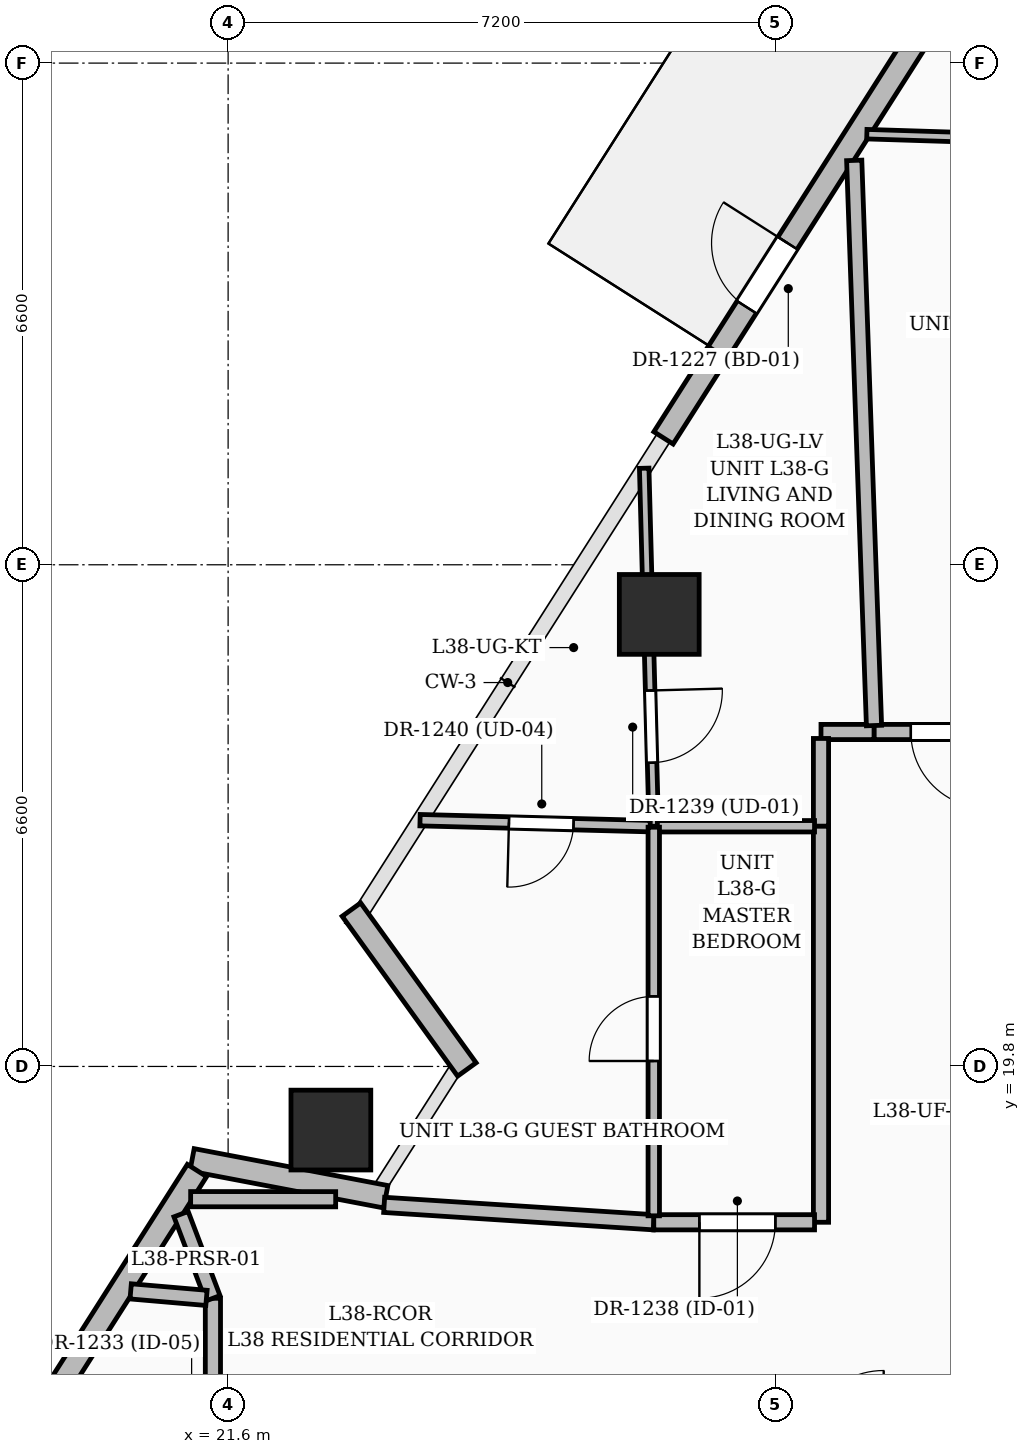
"""IFC4 building model, lengths in metres.
Left out: names, types, materials, properties, quantities, classifications, styles, units other than length and angle.
Written with IfcOpenShell. Run it as: python <this file> out.ifc"""

import sys

from ifc_helpers import new_model, si_unit, direction, frame, frame_2d, origin, origin_2d, place, context, subcontext, project, spatial, rectangle, extrude, element, fill, save


model = new_model("IFC4")
c1 = context("Model", 3, precision=1e-05, world=origin(), true_north=direction((0.0, 1.0)))
c2 = subcontext(c1, "Body", "Model", "MODEL_VIEW")
j1 = project(units=[si_unit("LENGTHUNIT", "METRE"), si_unit("PLANEANGLEUNIT", "RADIAN")], contexts=[c1])
p1 = place(None, origin())
s1 = spatial("IfcSite", under=j1, at=p1, CompositionType="ELEMENT")
p2 = place(p1, origin())
s2 = spatial("IfcBuilding", under=s1, at=p2, CompositionType="ELEMENT")
p3 = place(p2, frame((0.0, 0.0, 150.0)))
s3 = spatial("IfcBuildingStorey", under=s2, at=p3, CompositionType="ELEMENT", Elevation=150.0)
for number, where, z_axis, x_axis in (
    (1, (27.272, 25.747, 0.0), (0.0, 0.0, 1.0), (1.0, 0.0, 0.0)),
    (2, (22.952, 18.963, 0.0), (0.0, 0.0, 1.0), (1.0, 0.0, 0.0)),
):
    element("IfcColumn", number, at=place(p3, frame(where, z_axis=z_axis, x_axis=x_axis)), inside=s3, PredefinedType="COLUMN", context=c2, shape_type="SweptSolid", body=[
        extrude(rectangle(XDim=1.05, YDim=1.05, at=origin_2d()), origin(), (0.0, 0.0, 1.0), 3.6),
    ])
p4 = place(p3, frame((21.125, 18.571, 0.0), z_axis=(0.0, 0.0, 1.0), x_axis=(0.982321262429, -0.187202931012, 0.0)))
e3 = element("IfcWall", 3, at=p4, inside=s3, PredefinedType="SOLIDWALL", context=c2, shape_type="SweptSolid", body=[
    extrude(rectangle(XDim=2.594, YDim=0.3, at=frame_2d((1.297, 0.0))), origin(), (0.0, 0.0, 1.0), 2.3),
])
p5 = place(p3, frame((24.741, 19.76, 0.0), z_axis=(0.0, 0.0, 1.0), x_axis=(-0.585538656592, 0.810644485355, 0.0)))
e4 = element("IfcWall", 4, at=p5, inside=s3, PredefinedType="SOLIDWALL", context=c2, shape_type="SweptSolid", body=[
    extrude(rectangle(XDim=2.594, YDim=0.3, at=frame_2d((1.297, 0.0))), origin(), (0.0, 0.0, 1.0), 2.575),
])
p6 = place(p3, frame((27.328, 28.069, 0.0), z_axis=(0.0, 0.0, 1.0), x_axis=(0.537125937868, 0.843502060975, 0.0)))
e5 = element("IfcWall", 5, at=p6, inside=s3, PredefinedType="SOLIDWALL", context=c2, shape_type="SweptSolid", body=[
    extrude(rectangle(XDim=7.632, YDim=0.3, at=frame_2d((3.816, 0.0))), origin(), (0.0, 0.0, 1.0), 3.35),
])
p7 = place(p6, frame((2.038, 0.0, 0.0)))
e6 = element("IfcOpeningElement", 6, at=p7, cuts=e5, PredefinedType="OPENING", context=c2, shape_type="SweptSolid", body=[
    extrude(rectangle(XDim=1.0, YDim=2.2, at=frame_2d((0.5, 1.1))), frame((0.0, 0.16, 0.0), z_axis=(0.0, -1.0, 0.0), x_axis=(1.0, 0.0, 0.0)), (0.0, 0.0, 1.0), 0.32),
])
p8 = place(p3, frame((17.006, 11.86, 0.0), z_axis=(0.0, 0.0, 1.0), x_axis=(0.537098524817, 0.843519516454, 0.0)))
e7 = element("IfcWall", 7, at=p8, inside=s3, PredefinedType="SOLIDWALL", context=c2, shape_type="SweptSolid", body=[
    extrude(rectangle(XDim=7.791, YDim=0.3, at=frame_2d((3.895, 0.0))), origin(), (0.0, 0.0, 1.0), 3.35),
])
p9 = place(p8, frame((2.675, 0.0, 0.8)))
e8 = element("IfcOpeningElement", 8, at=p9, cuts=e7, PredefinedType="OPENING", context=c2, shape_type="SweptSolid", body=[
    extrude(rectangle(XDim=1.2, YDim=1.8, at=frame_2d((0.6, 0.9))), frame((0.0, 0.16, 0.0), z_axis=(0.0, -1.0, 0.0), x_axis=(1.0, 0.0, 0.0)), (0.0, 0.0, 1.0), 0.32),
])
p10 = place(p3, frame((21.4, 16.75, 0.0), z_axis=(0.0, 0.0, 1.0), x_axis=(0.0, -1.0, 0.0)))
e9 = element("IfcWall", 9, at=p10, inside=s3, PredefinedType="PARTITIONING", context=c2, shape_type="SweptSolid", body=[
    extrude(rectangle(XDim=4.5, YDim=0.2, at=frame_2d((2.25, 0.0))), origin(), (0.0, 0.0, 1.0), 2.57),
])
p11 = place(p10, frame((1.45, 0.0, 0.0)))
e10 = element("IfcOpeningElement", 10, at=p11, cuts=e9, PredefinedType="OPENING", context=c2, shape_type="SweptSolid", body=[
    extrude(rectangle(XDim=1.6, YDim=2.3, at=frame_2d((0.8, 1.15))), frame((0.0, 0.11, 0.0), z_axis=(0.0, -1.0, 0.0), x_axis=(1.0, 0.0, 0.0)), (0.0, 0.0, 1.0), 0.22),
])
p12 = place(p3, frame((30.1, 24.2, 0.0), z_axis=(0.0, 0.0, 1.0), x_axis=(-1.0, 0.0, 0.0)))
e11 = element("IfcWall", 11, at=p12, inside=s3, PredefinedType="PARTITIONING", context=c2, shape_type="SweptSolid", body=[
    extrude(rectangle(XDim=0.7, YDim=0.2, at=frame_2d((0.35, 0.0))), origin(), (0.0, 0.0, 1.0), 1.12),
])
p13 = place(p3, frame((29.4, 24.115, 0.0), z_axis=(0.0, 0.0, 1.0), x_axis=(0.0, -1.0, 0.0)))
e12 = element("IfcWall", 12, at=p13, inside=s3, PredefinedType="PARTITIONING", context=c2, shape_type="SweptSolid", body=[
    extrude(rectangle(XDim=1.155, YDim=0.2, at=frame_2d((0.578, 0.0))), origin(), (0.0, 0.0, 1.0), 1.12),
])
p14 = place(p3, frame((27.2, 17.75, 0.0), z_axis=(0.0, 0.0, 1.0), x_axis=(-0.997922175828, 0.064430823302, 0.0)))
e13 = element("IfcWall", 13, at=p14, inside=s3, PredefinedType="PARTITIONING", context=c2, shape_type="SweptSolid", body=[
    extrude(rectangle(XDim=3.554, YDim=0.2, at=frame_2d((1.777, 0.0))), origin(), (0.0, 0.0, 1.0), 1.12),
])
p15 = place(p3, frame((20.981, 17.857, 0.0), z_axis=(0.0, 0.0, 1.0), x_axis=(0.353970125301, -0.935256729671, 0.0)))
e14 = element("IfcWall", 14, at=p15, inside=s3, PredefinedType="PARTITIONING", context=c2, shape_type="SweptSolid", body=[
    extrude(rectangle(XDim=1.184, YDim=0.2, at=frame_2d((0.592, 0.0))), origin(), (0.0, 0.0, 1.0), 2.57),
])
p16 = place(p3, frame((29.4, 22.96, 0.0), z_axis=(0.0, 0.0, 1.0), x_axis=(0.0, -1.0, 0.0)))
e15 = element("IfcWall", 15, at=p16, inside=s3, PredefinedType="PARTITIONING", context=c2, shape_type="SweptSolid", body=[
    extrude(rectangle(XDim=5.21, YDim=0.2, at=frame_2d((2.605, 0.0))), origin(), (0.0, 0.0, 1.0), 1.12),
])
p17 = place(p3, frame((29.315, 17.75, 0.0), z_axis=(0.0, 0.0, 1.0), x_axis=(-1.0, 0.0, 0.0)))
e16 = element("IfcWall", 16, at=p17, inside=s3, PredefinedType="PARTITIONING", context=c2, shape_type="SweptSolid", body=[
    extrude(rectangle(XDim=2.115, YDim=0.2, at=frame_2d((1.058, 0.0))), origin(), (0.0, 0.0, 1.0), 2.86),
])
p18 = place(p17, frame((0.515, 0.0, 0.0)))
e17 = element("IfcOpeningElement", 17, at=p18, cuts=e16, PredefinedType="OPENING", context=c2, shape_type="SweptSolid", body=[
    extrude(rectangle(XDim=1.0, YDim=2.2, at=frame_2d((0.5, 1.1))), frame((0.0, 0.11, 0.0), z_axis=(0.0, -1.0, 0.0), x_axis=(1.0, 0.0, 0.0)), (0.0, 0.0, 1.0), 0.22),
])
p19 = place(p3, frame((31.865, 24.2, 0.0), z_axis=(0.0, 0.0, 1.0), x_axis=(-1.0, 0.0, 0.0)))
e18 = element("IfcWall", 18, at=p19, inside=s3, PredefinedType="PARTITIONING", context=c2, shape_type="SweptSolid", body=[
    extrude(rectangle(XDim=1.765, YDim=0.2, at=frame_2d((0.882, 0.0))), origin(), (0.0, 0.0, 1.0), 2.86),
])
p20 = place(p19, frame((0.283, 0.0, 0.0)))
e19 = element("IfcOpeningElement", 19, at=p20, cuts=e18, PredefinedType="OPENING", context=c2, shape_type="SweptSolid", body=[
    extrude(rectangle(XDim=1.0, YDim=2.2, at=frame_2d((0.5, 1.1))), frame((0.0, 0.11, 0.0), z_axis=(0.0, -1.0, 0.0), x_axis=(1.0, 0.0, 0.0)), (0.0, 0.0, 1.0), 0.22),
])
p21 = place(p3, frame((21.315, 16.755, 0.0), z_axis=(0.0, 0.0, 1.0), x_axis=(-0.996327050831, 0.085629479638, 0.0)))
e20 = element("IfcWall", 20, at=p21, inside=s3, PredefinedType="PARTITIONING", context=c2, shape_type="SweptSolid", body=[
    extrude(rectangle(XDim=1.001, YDim=0.2, at=frame_2d((0.5, 0.0))), origin(), (0.0, 0.0, 1.0), 2.57),
])
p22 = place(p3, frame((27.074, 27.67, 0.0), z_axis=(0.0, 0.0, 1.0), x_axis=(0.026737275943, -0.999642495133, 0.0)))
e21 = element("IfcWall", 21, at=p22, inside=s3, PredefinedType="PARTITIONING", context=c2, shape_type="SweptSolid", body=[
    extrude(rectangle(XDim=4.712, YDim=0.125, at=frame_2d((2.356, 0.0))), origin(), (0.0, 0.0, 1.0), 2.57),
])
p23 = place(p22, frame((2.925, 0.0, 0.0)))
e22 = element("IfcOpeningElement", 22, at=p23, cuts=e21, PredefinedType="OPENING", context=c2, shape_type="SweptSolid", body=[
    extrude(rectangle(XDim=0.95, YDim=2.2, at=frame_2d((0.475, 1.1))), frame((0.0, 0.072, 0.0), z_axis=(0.0, -1.0, 0.0), x_axis=(1.0, 0.0, 0.0)), (0.0, 0.0, 1.0), 0.145),
])
p24 = place(p3, frame((27.248, 22.96, 0.0), z_axis=(0.0, 0.0, 1.0), x_axis=(1.0, 0.0, 0.0)))
e23 = element("IfcWall", 23, at=p24, inside=s3, PredefinedType="PARTITIONING", context=c2, shape_type="SweptSolid", body=[
    extrude(rectangle(XDim=2.067, YDim=0.15, at=frame_2d((1.034, 0.0))), origin(), (0.0, 0.0, 1.0), 1.12),
])
p25 = place(p3, frame((30.097, 24.285, 0.0), z_axis=(0.0, 0.0, 1.0), x_axis=(-0.035014963649, 0.999386788146, 0.0)))
e24 = element("IfcWall", 24, at=p25, inside=s3, PredefinedType="PARTITIONING", context=c2, shape_type="SweptSolid", body=[
    extrude(rectangle(XDim=7.44, YDim=0.2, at=frame_2d((3.72, 0.0))), origin(), (0.0, 0.0, 1.0), 2.57),
])
p26 = place(p3, frame((27.153, 22.961, 0.0), z_axis=(0.0, 0.0, 1.0), x_axis=(-0.999660967969, 0.026037456064, 0.0)))
e25 = element("IfcWall", 25, at=p26, inside=s3, PredefinedType="PARTITIONING", context=c2, shape_type="SweptSolid", body=[
    extrude(rectangle(XDim=3.029, YDim=0.15, at=frame_2d((1.514, 0.0))), origin(), (0.0, 0.0, 1.0), 2.57),
])
p27 = place(p26, frame((1.008, 0.0, 0.0)))
e26 = element("IfcOpeningElement", 26, at=p27, cuts=e25, PredefinedType="OPENING", context=c2, shape_type="SweptSolid", body=[
    extrude(rectangle(XDim=0.85, YDim=2.1, at=frame_2d((0.425, 1.05))), frame((0.0, 0.085, 0.0), z_axis=(0.0, -1.0, 0.0), x_axis=(1.0, 0.0, 0.0)), (0.0, 0.0, 1.0), 0.17),
])
p28 = place(p3, frame((27.2, 17.835, 0.0), z_axis=(0.0, 0.0, 1.0), x_axis=(0.0, 1.0, 0.0)))
e27 = element("IfcWall", 27, at=p28, inside=s3, PredefinedType="PARTITIONING", context=c2, shape_type="SweptSolid", body=[
    extrude(rectangle(XDim=5.113, YDim=0.15, at=frame_2d((2.556, 0.0))), origin(), (0.0, 0.0, 1.0), 2.86),
])
p29 = place(p28, frame((2.037, 0.0, 0.0)))
e28 = element("IfcOpeningElement", 28, at=p29, cuts=e27, PredefinedType="OPENING", context=c2, shape_type="SweptSolid", body=[
    extrude(rectangle(XDim=0.85, YDim=2.1, at=frame_2d((0.425, 1.05))), frame((0.0, 0.085, 0.0), z_axis=(0.0, -1.0, 0.0), x_axis=(1.0, 0.0, 0.0)), (0.0, 0.0, 1.0), 0.17),
])
p30 = place(p3, frame((33.33, 31.96, 0.0), z_axis=(0.0, 0.0, 1.0), x_axis=(-0.999502585392, 0.03153699088, 0.0)))
e29 = element("IfcWall", 29, at=p30, inside=s3, PredefinedType="PARTITIONING", context=c2, shape_type="SweptSolid", body=[
    extrude(rectangle(XDim=3.329, YDim=0.125, at=frame_2d((1.665, 0.0))), origin(), (0.0, 0.0, 1.0), 1.12),
])
p31 = place(p3, frame((23.015, 18.053, 0.0), z_axis=(0.0, 0.0, 1.0), x_axis=(-0.999999869012, 0.000511836145, 0.0)))
e30 = element("IfcWall", 30, at=p31, inside=s3, PredefinedType="PARTITIONING", context=c2, shape_type="SweptSolid", body=[
    extrude(rectangle(XDim=1.908, YDim=0.2, at=frame_2d((0.954, 0.0))), origin(), (0.0, 0.0, 1.0), 1.12),
])
p32 = place(p7, origin())
e31 = element("IfcDoor", 31, at=p32, inside=s3, OperationType="SINGLE_SWING_RIGHT", PredefinedType="DOOR", context=c2, shape_type="SweptSolid", body=[
    extrude(rectangle(XDim=1.0, YDim=2.2, at=frame_2d((0.5, 1.1))), frame((0.0, 0.025, 0.0), z_axis=(0.0, -1.0, 0.0), x_axis=(1.0, 0.0, 0.0)), (0.0, 0.0, 1.0), 0.05),
])
fill(e6, e31)
p33 = place(p18, origin())
e32 = element("IfcDoor", 32, at=p33, inside=s3, OperationType="SINGLE_SWING_RIGHT", PredefinedType="DOOR", context=c2, shape_type="SweptSolid", body=[
    extrude(rectangle(XDim=1.0, YDim=2.2, at=frame_2d((0.5, 1.1))), frame((0.0, 0.025, 0.0), z_axis=(0.0, -1.0, 0.0), x_axis=(1.0, 0.0, 0.0)), (0.0, 0.0, 1.0), 0.05),
])
fill(e17, e32)
p34 = place(p23, origin())
e33 = element("IfcDoor", 33, at=p34, inside=s3, OperationType="SINGLE_SWING_LEFT", PredefinedType="DOOR", context=c2, shape_type="SweptSolid", body=[
    extrude(rectangle(XDim=0.95, YDim=2.2, at=frame_2d((0.475, 1.1))), frame((0.0, 0.025, 0.0), z_axis=(0.0, -1.0, 0.0), x_axis=(1.0, 0.0, 0.0)), (0.0, 0.0, 1.0), 0.05),
])
fill(e22, e33)
p35 = place(p27, origin())
e34 = element("IfcDoor", 34, at=p35, inside=s3, OperationType="SINGLE_SWING_RIGHT", PredefinedType="DOOR", context=c2, shape_type="SweptSolid", body=[
    extrude(rectangle(XDim=0.85, YDim=2.1, at=frame_2d((0.425, 1.05))), frame((0.0, 0.025, 0.0), z_axis=(0.0, -1.0, 0.0), x_axis=(1.0, 0.0, 0.0)), (0.0, 0.0, 1.0), 0.05),
])
fill(e26, e34)
p36 = place(p20, origin())
e35 = element("IfcDoor", 35, at=p36, inside=s3, OperationType="SINGLE_SWING_LEFT", PredefinedType="DOOR", context=c2, shape_type="SweptSolid", body=[
    extrude(rectangle(XDim=1.0, YDim=2.2, at=frame_2d((0.5, 1.1))), frame((0.0, 0.025, 0.0), z_axis=(0.0, -1.0, 0.0), x_axis=(1.0, 0.0, 0.0)), (0.0, 0.0, 1.0), 0.05),
])
fill(e19, e35)
p37 = place(p29, origin())
e36 = element("IfcDoor", 36, at=p37, inside=s3, OperationType="SINGLE_SWING_LEFT", PredefinedType="DOOR", context=c2, shape_type="SweptSolid", body=[
    extrude(rectangle(XDim=0.85, YDim=2.1, at=frame_2d((0.425, 1.05))), frame((0.0, 0.025, 0.0), z_axis=(0.0, -1.0, 0.0), x_axis=(1.0, 0.0, 0.0)), (0.0, 0.0, 1.0), 0.05),
])
fill(e28, e36)
save(model, sys.argv[1])
